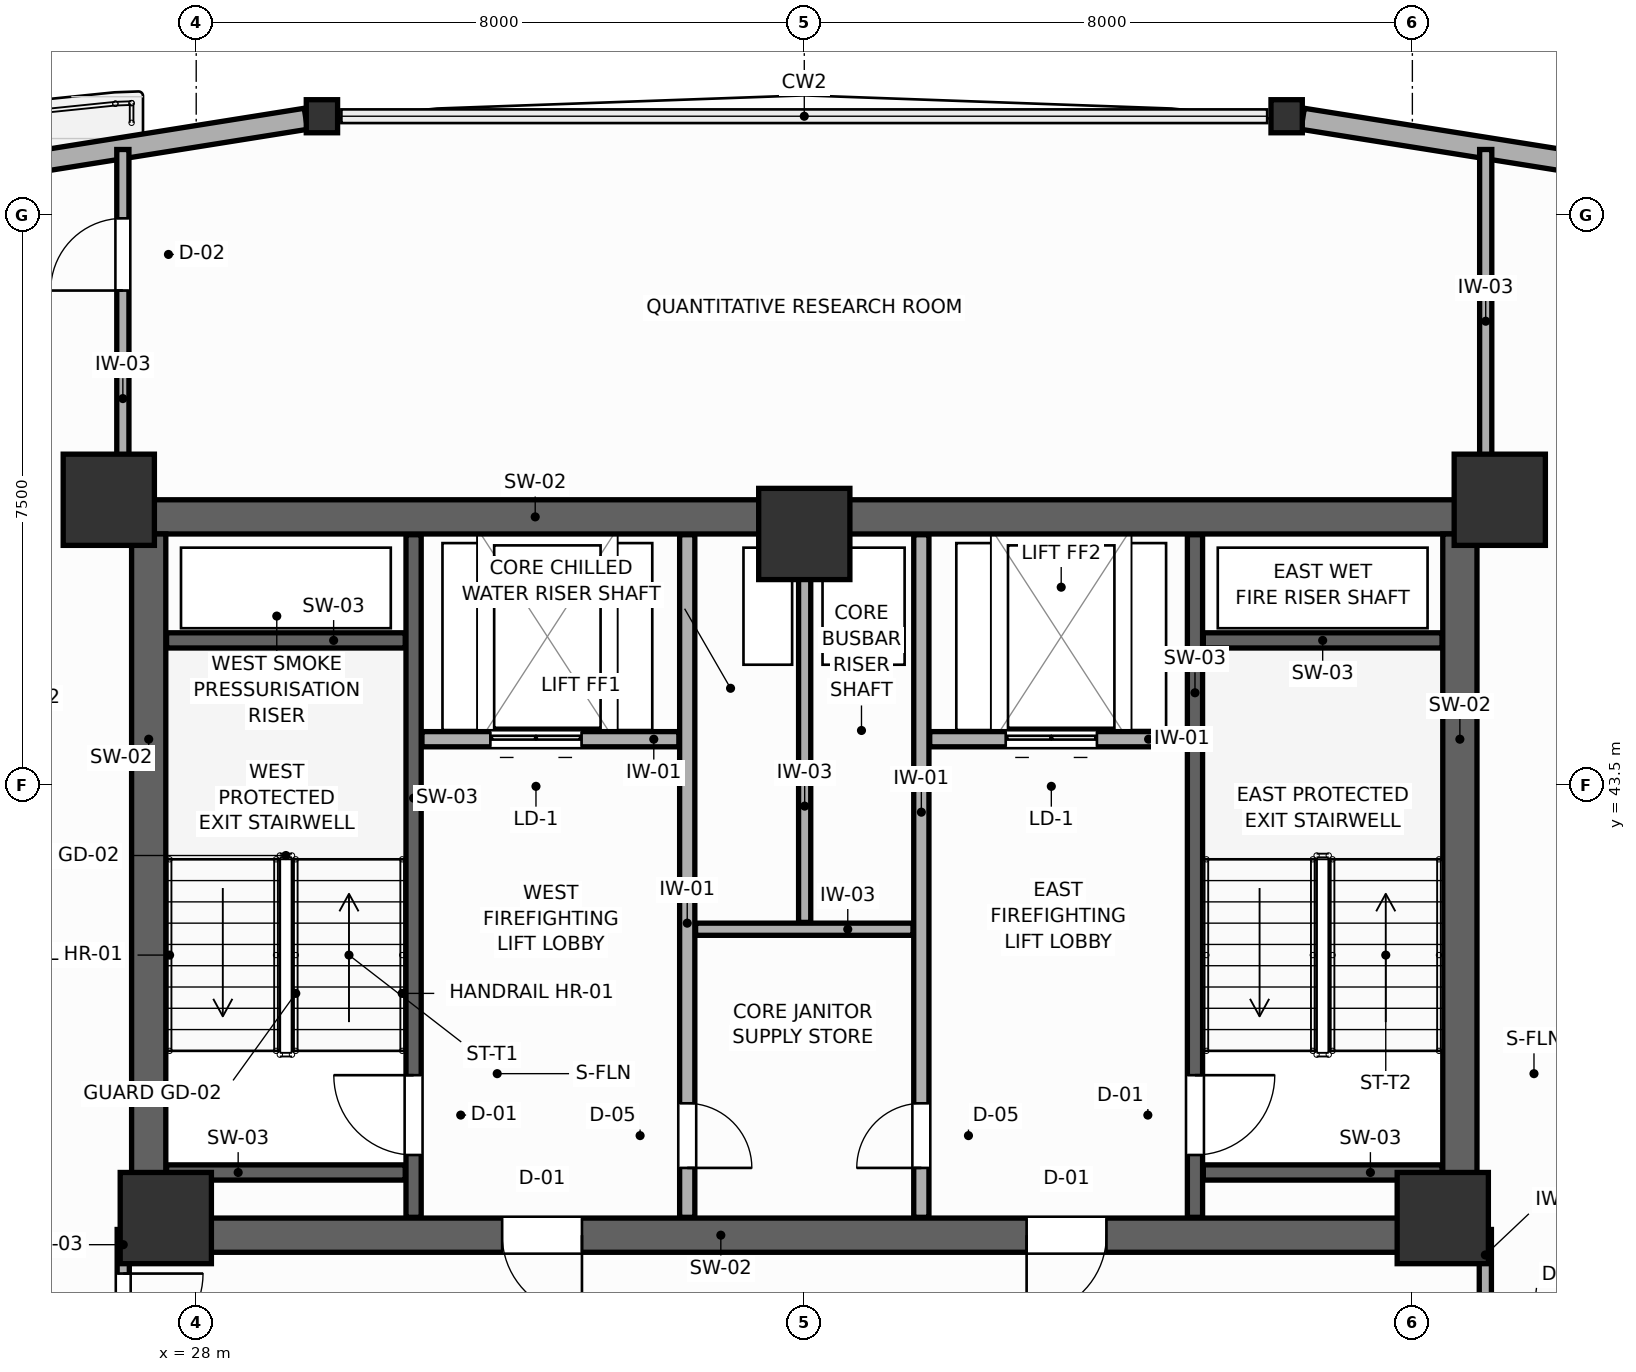
"""IFC4 building model, lengths in metres.
Left out: names, types, materials, properties, quantities, classifications, styles, units other than length and angle.
Written with IfcOpenShell. Run it as: python <this file> out.ifc"""

import sys

from ifc_helpers import new_model, si_unit, direction, frame, frame_2d, origin, origin_2d, place, context, subcontext, project, spatial, rectangle, i_section, extrude, source, transform, mapped, element, fill, save


model = new_model("IFC4")
c1 = context("Model", 3, precision=1e-05, world=origin(), true_north=direction((0.0, 1.0)))
c2 = subcontext(c1, "Body", "Model", "MODEL_VIEW")
j1 = project(units=[si_unit("LENGTHUNIT", "METRE"), si_unit("PLANEANGLEUNIT", "RADIAN")], contexts=[c1])
p1 = place(None, origin())
s1 = spatial("IfcSite", under=j1, at=p1, CompositionType="ELEMENT")
p2 = place(p1, origin())
s2 = spatial("IfcBuilding", under=s1, at=p2, CompositionType="ELEMENT")
p3 = place(p2, frame((0.0, 0.0, 168.6)))
s3 = spatial("IfcBuildingStorey", under=s2, at=p3, CompositionType="ELEMENT", Elevation=168.6)
p4 = place(p3, frame((27.15, 47.025, 0.0), z_axis=(0.0, 0.0, 1.0), x_axis=(1.0, 0.0, 0.0)))
e1 = element("IfcWall", 1, at=p4, inside=s3, PredefinedType="SHEAR", context=c2, shape_type="SweptSolid", body=[
    extrude(rectangle(XDim=17.7, YDim=0.45, at=frame_2d((8.85, 0.0))), origin(), (0.0, 0.0, 1.0), 3.6),
])
p5 = place(p3, frame((27.15, 37.575, 0.0), z_axis=(0.0, 0.0, 1.0), x_axis=(1.0, 0.0, 0.0)))
e2 = element("IfcWall", 2, at=p5, inside=s3, PredefinedType="SHEAR", context=c2, shape_type="SweptSolid", body=[
    extrude(rectangle(XDim=17.7, YDim=0.45, at=frame_2d((8.85, 0.0))), origin(), (0.0, 0.0, 1.0), 3.6),
])
p6 = place(p5, frame((4.875, 0.0, 0.0)))
e3 = element("IfcOpeningElement", 3, at=p6, cuts=e2, PredefinedType="OPENING", context=c2, shape_type="SweptSolid", body=[
    extrude(rectangle(XDim=1.05, YDim=2.1, at=frame_2d((0.525, 1.05))), frame((0.0, 0.235, 0.0), z_axis=(0.0, -1.0, 0.0), x_axis=(1.0, 0.0, 0.0)), (0.0, 0.0, 1.0), 0.47),
])
p7 = place(p5, frame((11.775, 0.0, 0.0)))
e4 = element("IfcOpeningElement", 4, at=p7, cuts=e2, PredefinedType="OPENING", context=c2, shape_type="SweptSolid", body=[
    extrude(rectangle(XDim=1.05, YDim=2.1, at=frame_2d((0.525, 1.05))), frame((0.0, 0.235, 0.0), z_axis=(0.0, -1.0, 0.0), x_axis=(1.0, 0.0, 0.0)), (0.0, 0.0, 1.0), 0.47),
])
for number, where, z_axis, x_axis in (
    (5, (27.375, 37.8, 0.0), (0.0, 0.0, 1.0), (0.0, 1.0, 0.0)),
    (6, (44.625, 37.8, 0.0), (0.0, 0.0, 1.0), (0.0, 1.0, 0.0)),
):
    element("IfcWall", number, at=place(p3, frame(where, z_axis=z_axis, x_axis=x_axis)), inside=s3, PredefinedType="SHEAR", context=c2, shape_type="SweptSolid", body=[
        extrude(rectangle(XDim=9.0, YDim=0.45, at=frame_2d((4.5, 0.0))), origin(), (0.0, 0.0, 1.0), 3.6),
    ])
m1 = source(origin(), c2, "Body", "SweptSolid", [
    extrude(rectangle(XDim=1.2, YDim=1.2, at=origin_2d()), origin(), (0.0, 0.0, 1.0), 3.6),
])
for number, where, z_axis, x_axis in (
    (7, (26.85, 47.25, 0.0), (0.0, 0.0, 1.0), (1.0, 0.0, 0.0)),
    (8, (45.15, 47.25, 0.0), (0.0, 0.0, 1.0), (1.0, 0.0, 0.0)),
    (9, (27.6, 37.8, 0.0), (0.0, 0.0, 1.0), (1.0, 0.0, 0.0)),
    (10, (44.4, 37.8, 0.0), (0.0, 0.0, 1.0), (1.0, 0.0, 0.0)),
    (11, (36.0, 46.8, 0.0), (0.0, 0.0, 1.0), (1.0, 0.0, 0.0)),
):
    element("IfcColumn", number, at=place(p3, frame(where, z_axis=z_axis, x_axis=x_axis)), inside=s3, PredefinedType="COLUMN", context=c2, shape_type="MappedRepresentation", body=[
        mapped(m1, transform((0.0, 0.0, 0.0), scale=1.0)),
    ])
m2 = source(origin(), c2, "Body", "SweptSolid", [
    extrude(i_section(OverallWidth=0.412, OverallDepth=0.435, WebThickness=0.033, FlangeThickness=0.053, FilletRadius=0.015, at=origin_2d()), origin(), (0.0, 0.0, 1.0), 3.6),
])
for number, where, z_axis, x_axis in (
    (12, (42.346, 52.296, 0.0), (0.0, 0.0, 1.0), (1.0, 0.0, 0.0)),
    (13, (29.654, 52.296, 0.0), (0.0, 0.0, 1.0), (1.0, 0.0, 0.0)),
):
    element("IfcColumn", number, at=place(p3, frame(where, z_axis=z_axis, x_axis=x_axis)), inside=s3, PredefinedType="COLUMN", context=c2, shape_type="MappedRepresentation", body=[
        mapped(m2, transform((0.0, 0.0, 0.0), scale=1.0)),
    ])
p8 = place(p3, frame((56.691, 50.009, 0.0), z_axis=(0.0, 0.0, 1.0), x_axis=(-0.987526171813, 0.157454945885, 0.0)))
e14 = element("IfcWall", 14, at=p8, inside=s3, PredefinedType="SOLIDWALL", context=c2, shape_type="SweptSolid", body=[
    extrude(rectangle(XDim=14.313, YDim=0.28, at=frame_2d((7.156, 0.0))), origin(), (0.0, 0.0, 1.0), 3.0),
])
p9 = place(p3, frame((29.443, 52.262, 0.0), z_axis=(0.0, 0.0, 1.0), x_axis=(-0.987526171813, -0.157454945885, 0.0)))
e15 = element("IfcWall", 15, at=p9, inside=s3, PredefinedType="SOLIDWALL", context=c2, shape_type="SweptSolid", body=[
    extrude(rectangle(XDim=14.313, YDim=0.28, at=frame_2d((7.156, 0.0))), origin(), (0.0, 0.0, 1.0), 2.95),
])
p10 = place(p3, frame((30.86, 37.81, 0.0), z_axis=(0.0, 0.0, 1.0), x_axis=(0.0, 1.0, 0.0)))
e16 = element("IfcWall", 16, at=p10, inside=s3, PredefinedType="SHEAR", context=c2, shape_type="SweptSolid", body=[
    extrude(rectangle(XDim=8.98, YDim=0.2, at=frame_2d((4.49, 0.0))), origin(), (0.0, 0.0, 1.0), 3.6),
])
p11 = place(p10, frame((0.82, 0.0, 0.0)))
e17 = element("IfcOpeningElement", 17, at=p11, cuts=e16, PredefinedType="OPENING", context=c2, shape_type="SweptSolid", body=[
    extrude(rectangle(XDim=1.05, YDim=2.1, at=frame_2d((0.525, 1.05))), frame((0.0, 0.11, 0.0), z_axis=(0.0, -1.0, 0.0), x_axis=(1.0, 0.0, 0.0)), (0.0, 0.0, 1.0), 0.22),
])
for number, where, z_axis, x_axis in (
    (18, (27.61, 45.4, 0.0), (0.0, 0.0, 1.0), (1.0, 0.0, 0.0)),
    (19, (27.61, 38.4, 0.0), (0.0, 0.0, 1.0), (1.0, 0.0, 0.0)),
):
    element("IfcWall", number, at=place(p3, frame(where, z_axis=z_axis, x_axis=x_axis)), inside=s3, PredefinedType="SHEAR", context=c2, shape_type="SweptSolid", body=[
        extrude(rectangle(XDim=3.14, YDim=0.2, at=frame_2d((1.57, 0.0))), origin(), (0.0, 0.0, 1.0), 3.6),
    ])
p12 = place(p3, frame((41.14, 37.81, 0.0), z_axis=(0.0, 0.0, 1.0), x_axis=(0.0, 1.0, 0.0)))
e20 = element("IfcWall", 20, at=p12, inside=s3, PredefinedType="SHEAR", context=c2, shape_type="SweptSolid", body=[
    extrude(rectangle(XDim=8.98, YDim=0.2, at=frame_2d((4.49, 0.0))), origin(), (0.0, 0.0, 1.0), 3.6),
])
p13 = place(p12, frame((0.82, 0.0, 0.0)))
e21 = element("IfcOpeningElement", 21, at=p13, cuts=e20, PredefinedType="OPENING", context=c2, shape_type="SweptSolid", body=[
    extrude(rectangle(XDim=1.05, YDim=2.1, at=frame_2d((0.525, 1.05))), frame((0.0, 0.11, 0.0), z_axis=(0.0, -1.0, 0.0), x_axis=(1.0, 0.0, 0.0)), (0.0, 0.0, 1.0), 0.22),
])
for number, where, z_axis, x_axis in (
    (22, (41.25, 45.4, 0.0), (0.0, 0.0, 1.0), (1.0, 0.0, 0.0)),
    (23, (41.25, 38.4, 0.0), (0.0, 0.0, 1.0), (1.0, 0.0, 0.0)),
):
    element("IfcWall", number, at=place(p3, frame(where, z_axis=z_axis, x_axis=x_axis)), inside=s3, PredefinedType="SHEAR", context=c2, shape_type="SweptSolid", body=[
        extrude(rectangle(XDim=3.14, YDim=0.2, at=frame_2d((1.57, 0.0))), origin(), (0.0, 0.0, 1.0), 3.6),
    ])
p14 = place(p3, frame((30.97, 44.1, 0.0), z_axis=(0.0, 0.0, 1.0), x_axis=(1.0, 0.0, 0.0)))
e24 = element("IfcWall", 24, at=p14, inside=s3, PredefinedType="PARTITIONING", context=c2, shape_type="SweptSolid", body=[
    extrude(rectangle(XDim=3.38, YDim=0.2, at=frame_2d((1.69, 0.0))), origin(), (0.0, 0.0, 1.0), 3.4),
])
p15 = place(p14, frame((0.9, 0.0, 0.0)))
e25 = element("IfcOpeningElement", 25, at=p15, cuts=e24, PredefinedType="OPENING", context=c2, shape_type="SweptSolid", body=[
    extrude(rectangle(XDim=1.2, YDim=2.1, at=frame_2d((0.6, 1.05))), frame((0.0, 0.11, 0.0), z_axis=(0.0, -1.0, 0.0), x_axis=(1.0, 0.0, 0.0)), (0.0, 0.0, 1.0), 0.22),
])
p16 = place(p3, frame((37.65, 44.1, 0.0), z_axis=(0.0, 0.0, 1.0), x_axis=(1.0, 0.0, 0.0)))
e26 = element("IfcWall", 26, at=p16, inside=s3, PredefinedType="PARTITIONING", context=c2, shape_type="SweptSolid", body=[
    extrude(rectangle(XDim=3.38, YDim=0.2, at=frame_2d((1.69, 0.0))), origin(), (0.0, 0.0, 1.0), 3.4),
])
p17 = place(p16, frame((1.0, 0.0, 0.0)))
e27 = element("IfcOpeningElement", 27, at=p17, cuts=e26, PredefinedType="OPENING", context=c2, shape_type="SweptSolid", body=[
    extrude(rectangle(XDim=1.2, YDim=2.1, at=frame_2d((0.6, 1.05))), frame((0.0, 0.11, 0.0), z_axis=(0.0, -1.0, 0.0), x_axis=(1.0, 0.0, 0.0)), (0.0, 0.0, 1.0), 0.22),
])
p18 = place(p3, frame((34.46, 37.81, 0.0), z_axis=(0.0, 0.0, 1.0), x_axis=(0.0, 1.0, 0.0)))
e28 = element("IfcWall", 28, at=p18, inside=s3, PredefinedType="PARTITIONING", context=c2, shape_type="SweptSolid", body=[
    extrude(rectangle(XDim=8.98, YDim=0.2, at=frame_2d((4.49, 0.0))), origin(), (0.0, 0.0, 1.0), 3.4),
])
p19 = place(p18, frame((0.65, 0.0, 0.0)))
e29 = element("IfcOpeningElement", 29, at=p19, cuts=e28, PredefinedType="OPENING", context=c2, shape_type="SweptSolid", body=[
    extrude(rectangle(XDim=0.85, YDim=2.05, at=frame_2d((0.425, 1.025))), frame((0.0, 0.11, 0.0), z_axis=(0.0, -1.0, 0.0), x_axis=(1.0, 0.0, 0.0)), (0.0, 0.0, 1.0), 0.22),
])
p20 = place(p3, frame((37.54, 37.81, 0.0), z_axis=(0.0, 0.0, 1.0), x_axis=(0.0, 1.0, 0.0)))
e30 = element("IfcWall", 30, at=p20, inside=s3, PredefinedType="PARTITIONING", context=c2, shape_type="SweptSolid", body=[
    extrude(rectangle(XDim=8.98, YDim=0.2, at=frame_2d((4.49, 0.0))), origin(), (0.0, 0.0, 1.0), 3.4),
])
p21 = place(p20, frame((0.65, 0.0, 0.0)))
e31 = element("IfcOpeningElement", 31, at=p21, cuts=e30, PredefinedType="OPENING", context=c2, shape_type="SweptSolid", body=[
    extrude(rectangle(XDim=0.85, YDim=2.05, at=frame_2d((0.425, 1.025))), frame((0.0, 0.11, 0.0), z_axis=(0.0, -1.0, 0.0), x_axis=(1.0, 0.0, 0.0)), (0.0, 0.0, 1.0), 0.22),
])
p22 = place(p3, frame((34.57, 41.6, 0.0), z_axis=(0.0, 0.0, 1.0), x_axis=(1.0, 0.0, 0.0)))
e32 = element("IfcWall", 32, at=p22, inside=s3, PredefinedType="PARTITIONING", context=c2, shape_type="SweptSolid", body=[
    extrude(rectangle(XDim=2.86, YDim=0.16, at=frame_2d((1.43, 0.0))), origin(), (0.0, 0.0, 1.0), 3.4),
])
p23 = place(p3, frame((36.005, 41.69, 0.0), z_axis=(0.0, 0.0, 1.0), x_axis=(0.0, 1.0, 0.0)))
e33 = element("IfcWall", 33, at=p23, inside=s3, PredefinedType="PARTITIONING", context=c2, shape_type="SweptSolid", body=[
    extrude(rectangle(XDim=5.1, YDim=0.16, at=frame_2d((2.55, 0.0))), origin(), (0.0, 0.0, 1.0), 3.4),
])
p24 = place(p3, frame((27.04, 35.54, 0.0), z_axis=(0.0, 0.0, 1.0), x_axis=(0.0, 1.0, 0.0)))
e34 = element("IfcWall", 34, at=p24, inside=s3, PredefinedType="PARTITIONING", context=c2, shape_type="SweptSolid", body=[
    extrude(rectangle(XDim=2.11, YDim=0.16, at=frame_2d((1.055, 0.0))), origin(), (0.0, 0.0, 1.0), 3.4),
])
p25 = place(p24, frame((0.48, 0.0, 0.0)))
e35 = element("IfcOpeningElement", 35, at=p25, cuts=e34, PredefinedType="OPENING", context=c2, shape_type="SweptSolid", body=[
    extrude(rectangle(XDim=1.05, YDim=2.1, at=frame_2d((0.525, 1.05))), frame((0.0, 0.09, 0.0), z_axis=(0.0, -1.0, 0.0), x_axis=(1.0, 0.0, 0.0)), (0.0, 0.0, 1.0), 0.18),
])
p26 = place(p3, frame((44.96, 35.0, 0.0), z_axis=(0.0, 0.0, 1.0), x_axis=(0.0, 1.0, 0.0)))
e36 = element("IfcWall", 36, at=p26, inside=s3, PredefinedType="PARTITIONING", context=c2, shape_type="SweptSolid", body=[
    extrude(rectangle(XDim=2.65, YDim=0.16, at=frame_2d((1.325, 0.0))), origin(), (0.0, 0.0, 1.0), 3.4),
])
p27 = place(p26, frame((0.75, 0.0, 0.0)))
e37 = element("IfcOpeningElement", 37, at=p27, cuts=e36, PredefinedType="OPENING", context=c2, shape_type="SweptSolid", body=[
    extrude(rectangle(XDim=1.05, YDim=2.1, at=frame_2d((0.525, 1.05))), frame((0.0, 0.09, 0.0), z_axis=(0.0, -1.0, 0.0), x_axis=(1.0, 0.0, 0.0)), (0.0, 0.0, 1.0), 0.18),
])
p28 = place(p3, frame((27.035, 47.34, 0.0), z_axis=(0.0, 0.0, 1.0), x_axis=(0.0, 1.0, 0.0)))
e38 = element("IfcWall", 38, at=p28, inside=s3, PredefinedType="PARTITIONING", context=c2, shape_type="SweptSolid", body=[
    extrude(rectangle(XDim=4.518, YDim=0.16, at=frame_2d((2.259, 0.0))), origin(), (0.0, 0.0, 1.0), 3.4),
])
p29 = place(p28, frame((2.663, 0.0, 0.0)))
e39 = element("IfcOpeningElement", 39, at=p29, cuts=e38, PredefinedType="OPENING", context=c2, shape_type="SweptSolid", body=[
    extrude(rectangle(XDim=0.95, YDim=2.05, at=frame_2d((0.475, 1.025))), frame((0.0, 0.09, 0.0), z_axis=(0.0, -1.0, 0.0), x_axis=(1.0, 0.0, 0.0)), (0.0, 0.0, 1.0), 0.18),
])
p30 = place(p3, frame((44.965, 47.34, 0.0), z_axis=(0.0, 0.0, 1.0), x_axis=(0.0, 1.0, 0.0)))
e40 = element("IfcWall", 40, at=p30, inside=s3, PredefinedType="PARTITIONING", context=c2, shape_type="SweptSolid", body=[
    extrude(rectangle(XDim=4.518, YDim=0.16, at=frame_2d((2.259, 0.0))), origin(), (0.0, 0.0, 1.0), 3.4),
])
p31 = place(p11, origin())
e41 = element("IfcDoor", 41, at=p31, inside=s3, OperationType="SINGLE_SWING_RIGHT", PredefinedType="DOOR", context=c2, shape_type="SweptSolid", body=[
    extrude(rectangle(XDim=1.05, YDim=2.1, at=frame_2d((0.525, 1.05))), frame((0.0, 0.025, 0.0), z_axis=(0.0, -1.0, 0.0), x_axis=(1.0, 0.0, 0.0)), (0.0, 0.0, 1.0), 0.05),
])
fill(e17, e41)
p32 = place(p13, frame((1.05, 0.0, 0.0), z_axis=(0.0, 0.0, 1.0), x_axis=(-1.0, 0.0, 0.0)))
e42 = element("IfcDoor", 42, at=p32, inside=s3, OperationType="SINGLE_SWING_LEFT", PredefinedType="DOOR", context=c2, shape_type="SweptSolid", body=[
    extrude(rectangle(XDim=1.05, YDim=2.1, at=frame_2d((0.525, 1.05))), frame((0.0, 0.025, 0.0), z_axis=(0.0, -1.0, 0.0), x_axis=(1.0, 0.0, 0.0)), (0.0, 0.0, 1.0), 0.05),
])
fill(e21, e42)
p33 = place(p15, origin())
e43 = element("IfcDoor", 43, at=p33, inside=s3, OperationType="DOUBLE_DOOR_SLIDING", PredefinedType="DOOR", context=c2, shape_type="SweptSolid", body=[
    extrude(rectangle(XDim=1.2, YDim=2.1, at=frame_2d((0.6, 1.05))), frame((0.0, 0.025, 0.0), z_axis=(0.0, -1.0, 0.0), x_axis=(1.0, 0.0, 0.0)), (0.0, 0.0, 1.0), 0.05),
])
fill(e25, e43)
p34 = place(p17, origin())
e44 = element("IfcDoor", 44, at=p34, inside=s3, OperationType="DOUBLE_DOOR_SLIDING", PredefinedType="DOOR", context=c2, shape_type="SweptSolid", body=[
    extrude(rectangle(XDim=1.2, YDim=2.1, at=frame_2d((0.6, 1.05))), frame((0.0, 0.025, 0.0), z_axis=(0.0, -1.0, 0.0), x_axis=(1.0, 0.0, 0.0)), (0.0, 0.0, 1.0), 0.05),
])
fill(e27, e44)
p35 = place(p19, frame((0.85, 0.0, 0.0), z_axis=(0.0, 0.0, 1.0), x_axis=(-1.0, 0.0, 0.0)))
e45 = element("IfcDoor", 45, at=p35, inside=s3, OperationType="SINGLE_SWING_RIGHT", PredefinedType="DOOR", context=c2, shape_type="SweptSolid", body=[
    extrude(rectangle(XDim=0.85, YDim=2.05, at=frame_2d((0.425, 1.025))), frame((0.0, 0.025, 0.0), z_axis=(0.0, -1.0, 0.0), x_axis=(1.0, 0.0, 0.0)), (0.0, 0.0, 1.0), 0.05),
])
fill(e29, e45)
p36 = place(p21, origin())
e46 = element("IfcDoor", 46, at=p36, inside=s3, OperationType="SINGLE_SWING_LEFT", PredefinedType="DOOR", context=c2, shape_type="SweptSolid", body=[
    extrude(rectangle(XDim=0.85, YDim=2.05, at=frame_2d((0.425, 1.025))), frame((0.0, 0.025, 0.0), z_axis=(0.0, -1.0, 0.0), x_axis=(1.0, 0.0, 0.0)), (0.0, 0.0, 1.0), 0.05),
])
fill(e31, e46)
p37 = place(p25, frame((1.05, 0.0, 0.0), z_axis=(0.0, 0.0, 1.0), x_axis=(-1.0, 0.0, 0.0)))
e47 = element("IfcDoor", 47, at=p37, inside=s3, OperationType="SINGLE_SWING_LEFT", PredefinedType="DOOR", context=c2, shape_type="SweptSolid", body=[
    extrude(rectangle(XDim=1.05, YDim=2.1, at=frame_2d((0.525, 1.05))), frame((0.0, 0.025, 0.0), z_axis=(0.0, -1.0, 0.0), x_axis=(1.0, 0.0, 0.0)), (0.0, 0.0, 1.0), 0.05),
])
fill(e35, e47)
p38 = place(p29, origin())
e48 = element("IfcDoor", 48, at=p38, inside=s3, OperationType="SINGLE_SWING_LEFT", PredefinedType="DOOR", context=c2, shape_type="SweptSolid", body=[
    extrude(rectangle(XDim=0.95, YDim=2.05, at=frame_2d((0.475, 1.025))), frame((0.0, 0.025, 0.0), z_axis=(0.0, -1.0, 0.0), x_axis=(1.0, 0.0, 0.0)), (0.0, 0.0, 1.0), 0.05),
])
fill(e39, e48)
p39 = place(p6, frame((1.05, 0.0, 0.0), z_axis=(0.0, 0.0, 1.0), x_axis=(-1.0, 0.0, 0.0)))
e49 = element("IfcDoor", 49, at=p39, inside=s3, OperationType="SINGLE_SWING_LEFT", PredefinedType="DOOR", context=c2, shape_type="SweptSolid", body=[
    extrude(rectangle(XDim=1.05, YDim=2.1, at=frame_2d((0.525, 1.05))), frame((0.0, 0.025, 0.0), z_axis=(0.0, -1.0, 0.0), x_axis=(1.0, 0.0, 0.0)), (0.0, 0.0, 1.0), 0.05),
])
fill(e3, e49)
p40 = place(p7, frame((1.05, 0.0, 0.0), z_axis=(0.0, 0.0, 1.0), x_axis=(-1.0, 0.0, 0.0)))
e50 = element("IfcDoor", 50, at=p40, inside=s3, OperationType="SINGLE_SWING_RIGHT", PredefinedType="DOOR", context=c2, shape_type="SweptSolid", body=[
    extrude(rectangle(XDim=1.05, YDim=2.1, at=frame_2d((0.525, 1.05))), frame((0.0, 0.025, 0.0), z_axis=(0.0, -1.0, 0.0), x_axis=(1.0, 0.0, 0.0)), (0.0, 0.0, 1.0), 0.05),
])
fill(e4, e50)
save(model, sys.argv[1])
